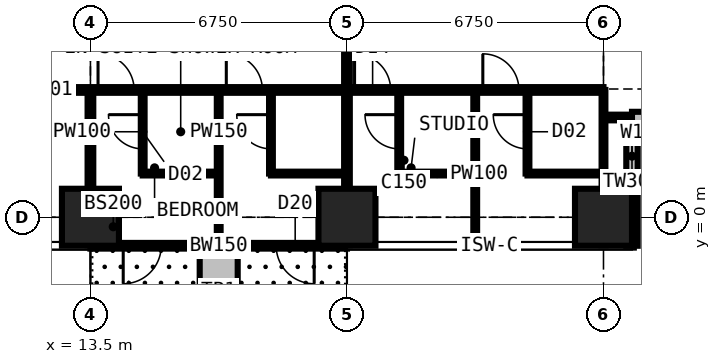
"""IFC4 building model, lengths in metres.
Left out: names, types, materials, properties, quantities, classifications, styles, units other than length and angle.
Written with IfcOpenShell. Run it as: python <this file> out.ifc"""

import sys

from ifc_helpers import new_model, si_unit, direction, frame, frame_2d, origin, origin_2d, place, context, subcontext, project, spatial, rectangle, extrude, element, fill, save


model = new_model("IFC4")
c1 = context("Model", 3, precision=1e-05, world=origin(), true_north=direction((0.0, 1.0)))
c2 = subcontext(c1, "Body", "Model", "MODEL_VIEW")
j1 = project(units=[si_unit("LENGTHUNIT", "METRE"), si_unit("PLANEANGLEUNIT", "RADIAN")], contexts=[c1])
p1 = place(None, origin())
s1 = spatial("IfcSite", under=j1, at=p1, CompositionType="ELEMENT")
p2 = place(p1, origin())
s2 = spatial("IfcBuilding", under=s1, at=p2, CompositionType="ELEMENT")
p3 = place(p2, frame((0.0, 0.0, 163.8)))
s3 = spatial("IfcBuildingStorey", under=s2, at=p3, CompositionType="ELEMENT", Elevation=163.8)
for number, where, z_axis, x_axis in (
    (1, (13.5, 0.0, 0.0), (0.0, 0.0, 1.0), (1.0, 0.0, 0.0)),
    (2, (20.25, 0.0, 0.0), (0.0, 0.0, 1.0), (1.0, 0.0, 0.0)),
    (3, (27.0, 0.0, 0.0), (0.0, 0.0, 1.0), (1.0, 0.0, 0.0)),
):
    element("IfcColumn", number, at=place(p3, frame(where, z_axis=z_axis, x_axis=x_axis)), inside=s3, PredefinedType="COLUMN", context=c2, shape_type="SweptSolid", body=[
        extrude(rectangle(XDim=1.5, YDim=1.5, at=origin_2d()), origin(), (0.0, 0.0, 1.0), 3.6),
    ])
p4 = place(p3, frame((20.25, -0.75, 0.0), z_axis=(0.0, 0.0, 1.0), x_axis=(-1.0, 0.0, 0.0)))
e4 = element("IfcWall", 4, at=p4, inside=s3, PredefinedType="SOLIDWALL", context=c2, shape_type="SweptSolid", body=[
    extrude(rectangle(XDim=6.75, YDim=0.15, at=frame_2d((3.375, 0.0))), origin(), (0.0, 0.0, 1.0), 3.375),
])
p5 = place(p4, frame((0.863, 0.0, 0.0)))
e5 = element("IfcOpeningElement", 5, at=p5, cuts=e4, PredefinedType="OPENING", context=c2, shape_type="SweptSolid", body=[
    extrude(rectangle(XDim=1.0, YDim=2.2, at=frame_2d((0.5, 1.1))), frame((0.0, 0.085, 0.0), z_axis=(0.0, -1.0, 0.0), x_axis=(1.0, 0.0, 0.0)), (0.0, 0.0, 1.0), 0.17),
])
p6 = place(p4, frame((1.975, 0.0, 0.9)))
e6 = element("IfcOpeningElement", 6, at=p6, cuts=e4, PredefinedType="OPENING", context=c2, shape_type="SweptSolid", body=[
    extrude(rectangle(XDim=1.2, YDim=1.8, at=frame_2d((0.6, 0.9))), frame((0.0, 0.085, 0.0), z_axis=(0.0, -1.0, 0.0), x_axis=(1.0, 0.0, 0.0)), (0.0, 0.0, 1.0), 0.17),
])
p7 = place(p4, frame((4.887, 0.0, 0.0)))
e7 = element("IfcOpeningElement", 7, at=p7, cuts=e4, PredefinedType="OPENING", context=c2, shape_type="SweptSolid", body=[
    extrude(rectangle(XDim=1.0, YDim=2.2, at=frame_2d((0.5, 1.1))), frame((0.0, 0.085, 0.0), z_axis=(0.0, -1.0, 0.0), x_axis=(1.0, 0.0, 0.0)), (0.0, 0.0, 1.0), 0.17),
])
p8 = place(p4, frame((3.575, 0.0, 0.9)))
e8 = element("IfcOpeningElement", 8, at=p8, cuts=e4, PredefinedType="OPENING", context=c2, shape_type="SweptSolid", body=[
    extrude(rectangle(XDim=1.2, YDim=1.8, at=frame_2d((0.6, 0.9))), frame((0.0, 0.085, 0.0), z_axis=(0.0, -1.0, 0.0), x_axis=(1.0, 0.0, 0.0)), (0.0, 0.0, 1.0), 0.17),
])
p9 = place(p3, frame((27.75, -0.75, 0.0), z_axis=(0.0, 0.0, 1.0), x_axis=(0.0, 1.0, 0.0)))
e9 = element("IfcWall", 9, at=p9, inside=s3, PredefinedType="SOLIDWALL", context=c2, shape_type="SweptSolid", body=[
    extrude(rectangle(XDim=3.375, YDim=0.3, at=frame_2d((1.688, 0.0))), origin(), (0.0, 0.0, 1.0), 3.375),
])
p10 = place(p9, frame((1.607, 0.0, 0.9)))
e10 = element("IfcOpeningElement", 10, at=p10, cuts=e9, PredefinedType="OPENING", context=c2, shape_type="SweptSolid", body=[
    extrude(rectangle(XDim=1.5, YDim=1.8, at=frame_2d((0.75, 0.9))), frame((0.0, 0.16, 0.0), z_axis=(0.0, -1.0, 0.0), x_axis=(1.0, 0.0, 0.0)), (0.0, 0.0, 1.0), 0.32),
])
p11 = place(p3, frame((27.75, 2.625, 0.0), z_axis=(0.0, 0.0, 1.0), x_axis=(1.0, 0.0, 0.0)))
e11 = element("IfcWall", 11, at=p11, inside=s3, PredefinedType="SOLIDWALL", context=c2, shape_type="SweptSolid", body=[
    extrude(rectangle(XDim=3.375, YDim=0.3, at=frame_2d((1.688, 0.0))), origin(), (0.0, 0.0, 1.0), 3.375),
])
p12 = place(p11, frame((0.788, 0.0, 0.6)))
e12 = element("IfcOpeningElement", 12, at=p12, cuts=e11, PredefinedType="OPENING", context=c2, shape_type="SweptSolid", body=[
    extrude(rectangle(XDim=1.8, YDim=2.1, at=frame_2d((0.9, 1.05))), frame((0.0, 0.16, 0.0), z_axis=(0.0, -1.0, 0.0), x_axis=(1.0, 0.0, 0.0)), (0.0, 0.0, 1.0), 0.32),
])
p13 = place(p3, frame((16.875, -0.85, 0.0), z_axis=(0.0, 0.0, 1.0), x_axis=(0.0, -1.0, 0.0)))
e13 = element("IfcWall", 13, at=p13, inside=s3, PredefinedType="USERDEFINED", context=c2, shape_type="SweptSolid", body=[
    extrude(rectangle(XDim=2.2, YDim=1.0, at=frame_2d((1.1, 0.0))), origin(), (0.0, 0.0, 1.0), 0.9),
])
p14 = place(p3, frame((6.75, 3.35, 0.0), z_axis=(0.0, 0.0, 1.0), x_axis=(1.0, 0.0, 0.0)))
e14 = element("IfcWall", 14, at=p14, inside=s3, PredefinedType="PARTITIONING", context=c2, shape_type="SweptSolid", body=[
    extrude(rectangle(XDim=20.25, YDim=0.15, at=frame_2d((10.125, 0.0))), origin(), (0.0, 0.0, 1.0), 3.375),
])
p15 = place(p14, frame((2.85, 0.0, 0.0)))
e15 = element("IfcOpeningElement", 15, at=p15, cuts=e14, PredefinedType="OPENING", context=c2, shape_type="SweptSolid", body=[
    extrude(rectangle(XDim=1.0, YDim=2.2, at=frame_2d((0.5, 1.1))), frame((0.0, 0.085, 0.0), z_axis=(0.0, -1.0, 0.0), x_axis=(1.0, 0.0, 0.0)), (0.0, 0.0, 1.0), 0.17),
])
p16 = place(p14, frame((6.95, 0.0, 0.0)))
e16 = element("IfcOpeningElement", 16, at=p16, cuts=e14, PredefinedType="OPENING", context=c2, shape_type="SweptSolid", body=[
    extrude(rectangle(XDim=0.95, YDim=2.2, at=frame_2d((0.475, 1.1))), frame((0.0, 0.085, 0.0), z_axis=(0.0, -1.0, 0.0), x_axis=(1.0, 0.0, 0.0)), (0.0, 0.0, 1.0), 0.17),
])
p17 = place(p14, frame((10.325, 0.0, 0.0)))
e17 = element("IfcOpeningElement", 17, at=p17, cuts=e14, PredefinedType="OPENING", context=c2, shape_type="SweptSolid", body=[
    extrude(rectangle(XDim=0.95, YDim=2.2, at=frame_2d((0.475, 1.1))), frame((0.0, 0.085, 0.0), z_axis=(0.0, -1.0, 0.0), x_axis=(1.0, 0.0, 0.0)), (0.0, 0.0, 1.0), 0.17),
])
p18 = place(p14, frame((13.7, 0.0, 0.0)))
e18 = element("IfcOpeningElement", 18, at=p18, cuts=e14, PredefinedType="OPENING", context=c2, shape_type="SweptSolid", body=[
    extrude(rectangle(XDim=0.95, YDim=2.2, at=frame_2d((0.475, 1.1))), frame((0.0, 0.085, 0.0), z_axis=(0.0, -1.0, 0.0), x_axis=(1.0, 0.0, 0.0)), (0.0, 0.0, 1.0), 0.17),
])
p19 = place(p14, frame((17.075, 0.0, 0.0)))
e19 = element("IfcOpeningElement", 19, at=p19, cuts=e14, PredefinedType="OPENING", context=c2, shape_type="SweptSolid", body=[
    extrude(rectangle(XDim=0.95, YDim=2.2, at=frame_2d((0.475, 1.1))), frame((0.0, 0.085, 0.0), z_axis=(0.0, -1.0, 0.0), x_axis=(1.0, 0.0, 0.0)), (0.0, 0.0, 1.0), 0.17),
])
p20 = place(p3, frame((13.5, -0.734, 0.0), z_axis=(0.0, 0.0, 1.0), x_axis=(0.0, 1.0, 0.0)))
e20 = element("IfcWall", 20, at=p20, inside=s3, PredefinedType="PARTITIONING", context=c2, shape_type="SweptSolid", body=[
    extrude(rectangle(XDim=4.084, YDim=0.15, at=frame_2d((2.042, 0.0))), origin(), (0.0, 0.0, 1.0), 2.877),
])
p21 = place(p3, frame((14.875, 1.15, 0.0), z_axis=(0.0, 0.0, 1.0), x_axis=(0.0, 1.0, 0.0)))
e21 = element("IfcWall", 21, at=p21, inside=s3, PredefinedType="PARTITIONING", context=c2, shape_type="SweptSolid", body=[
    extrude(rectangle(XDim=2.2, YDim=0.1, at=frame_2d((1.1, 0.0))), origin(), (0.0, 0.0, 1.0), 3.375),
])
p22 = place(p21, frame((0.65, 0.0, 0.0)))
e22 = element("IfcOpeningElement", 22, at=p22, cuts=e21, PredefinedType="OPENING", context=c2, shape_type="SweptSolid", body=[
    extrude(rectangle(XDim=0.9, YDim=2.2, at=frame_2d((0.45, 1.1))), frame((0.0, 0.06, 0.0), z_axis=(0.0, -1.0, 0.0), x_axis=(1.0, 0.0, 0.0)), (0.0, 0.0, 1.0), 0.12),
])
p23 = place(p3, frame((14.875, 1.15, 0.0), z_axis=(0.0, 0.0, 1.0), x_axis=(1.0, 0.0, 0.0)))
e23 = element("IfcWall", 23, at=p23, inside=s3, PredefinedType="PARTITIONING", context=c2, shape_type="SweptSolid", body=[
    extrude(rectangle(XDim=2.0, YDim=0.1, at=frame_2d((1.0, 0.0))), origin(), (0.0, 0.0, 1.0), 3.375),
])
p24 = place(p3, frame((16.875, -0.734, 0.0), z_axis=(0.0, 0.0, 1.0), x_axis=(0.0, 1.0, 0.0)))
e24 = element("IfcWall", 24, at=p24, inside=s3, PredefinedType="PARTITIONING", context=c2, shape_type="SweptSolid", body=[
    extrude(rectangle(XDim=4.084, YDim=0.1, at=frame_2d((2.042, 0.0))), origin(), (0.0, 0.0, 1.0), 3.375),
])
p25 = place(p3, frame((18.25, 1.15, 0.0), z_axis=(0.0, 0.0, 1.0), x_axis=(0.0, 1.0, 0.0)))
e25 = element("IfcWall", 25, at=p25, inside=s3, PredefinedType="PARTITIONING", context=c2, shape_type="SweptSolid", body=[
    extrude(rectangle(XDim=2.2, YDim=0.1, at=frame_2d((1.1, 0.0))), origin(), (0.0, 0.0, 1.0), 3.375),
])
p26 = place(p25, frame((0.65, 0.0, 0.0)))
e26 = element("IfcOpeningElement", 26, at=p26, cuts=e25, PredefinedType="OPENING", context=c2, shape_type="SweptSolid", body=[
    extrude(rectangle(XDim=0.9, YDim=2.2, at=frame_2d((0.45, 1.1))), frame((0.0, 0.06, 0.0), z_axis=(0.0, -1.0, 0.0), x_axis=(1.0, 0.0, 0.0)), (0.0, 0.0, 1.0), 0.12),
])
p27 = place(p3, frame((18.25, 1.15, 0.0), z_axis=(0.0, 0.0, 1.0), x_axis=(1.0, 0.0, 0.0)))
e27 = element("IfcWall", 27, at=p27, inside=s3, PredefinedType="PARTITIONING", context=c2, shape_type="SweptSolid", body=[
    extrude(rectangle(XDim=2.0, YDim=0.1, at=frame_2d((1.0, 0.0))), origin(), (0.0, 0.0, 1.0), 3.375),
])
p28 = place(p3, frame((20.25, -0.734, 0.0), z_axis=(0.0, 0.0, 1.0), x_axis=(0.0, 1.0, 0.0)))
e28 = element("IfcWall", 28, at=p28, inside=s3, PredefinedType="PARTITIONING", context=c2, shape_type="SweptSolid", body=[
    extrude(rectangle(XDim=12.034, YDim=0.15, at=frame_2d((6.017, 0.0))), origin(), (0.0, 0.0, 1.0), 2.806),
])
p29 = place(p3, frame((21.625, 1.15, 0.0), z_axis=(0.0, 0.0, 1.0), x_axis=(0.0, 1.0, 0.0)))
e29 = element("IfcWall", 29, at=p29, inside=s3, PredefinedType="PARTITIONING", context=c2, shape_type="SweptSolid", body=[
    extrude(rectangle(XDim=2.2, YDim=0.1, at=frame_2d((1.1, 0.0))), origin(), (0.0, 0.0, 1.0), 3.375),
])
p30 = place(p29, frame((0.65, 0.0, 0.0)))
e30 = element("IfcOpeningElement", 30, at=p30, cuts=e29, PredefinedType="OPENING", context=c2, shape_type="SweptSolid", body=[
    extrude(rectangle(XDim=0.9, YDim=2.2, at=frame_2d((0.45, 1.1))), frame((0.0, 0.06, 0.0), z_axis=(0.0, -1.0, 0.0), x_axis=(1.0, 0.0, 0.0)), (0.0, 0.0, 1.0), 0.12),
])
p31 = place(p3, frame((21.625, 1.15, 0.0), z_axis=(0.0, 0.0, 1.0), x_axis=(1.0, 0.0, 0.0)))
e31 = element("IfcWall", 31, at=p31, inside=s3, PredefinedType="PARTITIONING", context=c2, shape_type="SweptSolid", body=[
    extrude(rectangle(XDim=2.0, YDim=0.1, at=frame_2d((1.0, 0.0))), origin(), (0.0, 0.0, 1.0), 3.375),
])
p32 = place(p3, frame((23.625, -0.734, 0.0), z_axis=(0.0, 0.0, 1.0), x_axis=(0.0, 1.0, 0.0)))
e32 = element("IfcWall", 32, at=p32, inside=s3, PredefinedType="PARTITIONING", context=c2, shape_type="SweptSolid", body=[
    extrude(rectangle(XDim=4.084, YDim=0.1, at=frame_2d((2.042, 0.0))), origin(), (0.0, 0.0, 1.0), 3.375),
])
p33 = place(p3, frame((25.0, 1.15, 0.0), z_axis=(0.0, 0.0, 1.0), x_axis=(0.0, 1.0, 0.0)))
e33 = element("IfcWall", 33, at=p33, inside=s3, PredefinedType="PARTITIONING", context=c2, shape_type="SweptSolid", body=[
    extrude(rectangle(XDim=2.2, YDim=0.1, at=frame_2d((1.1, 0.0))), origin(), (0.0, 0.0, 1.0), 3.375),
])
p34 = place(p33, frame((0.65, 0.0, 0.0)))
e34 = element("IfcOpeningElement", 34, at=p34, cuts=e33, PredefinedType="OPENING", context=c2, shape_type="SweptSolid", body=[
    extrude(rectangle(XDim=0.9, YDim=2.2, at=frame_2d((0.45, 1.1))), frame((0.0, 0.06, 0.0), z_axis=(0.0, -1.0, 0.0), x_axis=(1.0, 0.0, 0.0)), (0.0, 0.0, 1.0), 0.12),
])
p35 = place(p3, frame((25.0, 1.15, 0.0), z_axis=(0.0, 0.0, 1.0), x_axis=(1.0, 0.0, 0.0)))
e35 = element("IfcWall", 35, at=p35, inside=s3, PredefinedType="PARTITIONING", context=c2, shape_type="SweptSolid", body=[
    extrude(rectangle(XDim=2.0, YDim=0.1, at=frame_2d((1.0, 0.0))), origin(), (0.0, 0.0, 1.0), 3.375),
])
p36 = place(p3, frame((27.0, -0.734, 0.0), z_axis=(0.0, 0.0, 1.0), x_axis=(0.0, 1.0, 0.0)))
e36 = element("IfcWall", 36, at=p36, inside=s3, PredefinedType="PARTITIONING", context=c2, shape_type="SweptSolid", body=[
    extrude(rectangle(XDim=4.084, YDim=0.1, at=frame_2d((2.042, 0.0))), origin(), (0.0, 0.0, 1.0), 2.877),
])
p37 = place(p3, frame((27.0, 2.625, 0.0), z_axis=(0.0, 0.0, 1.0), x_axis=(1.0, 0.0, 0.0)))
e37 = element("IfcWall", 37, at=p37, inside=s3, PredefinedType="PARTITIONING", context=c2, shape_type="SweptSolid", body=[
    extrude(rectangle(XDim=0.734, YDim=0.15, at=frame_2d((0.367, 0.0))), origin(), (0.0, 0.0, 1.0), 3.375),
])
p38 = place(p5, origin())
e38 = element("IfcDoor", 38, at=p38, inside=s3, OperationType="SINGLE_SWING_LEFT", PredefinedType="DOOR", context=c2, shape_type="SweptSolid", body=[
    extrude(rectangle(XDim=1.0, YDim=2.2, at=frame_2d((0.5, 1.1))), frame((0.0, 0.025, 0.0), z_axis=(0.0, -1.0, 0.0), x_axis=(1.0, 0.0, 0.0)), (0.0, 0.0, 1.0), 0.05),
])
fill(e5, e38)
p39 = place(p6, origin())
e39 = element("IfcWindow", 39, at=p39, inside=s3, PartitioningType="SINGLE_PANEL", PredefinedType="WINDOW", context=c2, shape_type="SweptSolid", body=[
    extrude(rectangle(XDim=1.2, YDim=1.8, at=frame_2d((0.6, 0.9))), frame((0.0, 0.03, 0.0), z_axis=(0.0, -1.0, 0.0), x_axis=(1.0, 0.0, 0.0)), (0.0, 0.0, 1.0), 0.06),
])
fill(e6, e39)
p40 = place(p7, origin())
e40 = element("IfcDoor", 40, at=p40, inside=s3, OperationType="SINGLE_SWING_RIGHT", PredefinedType="DOOR", context=c2, shape_type="SweptSolid", body=[
    extrude(rectangle(XDim=1.0, YDim=2.2, at=frame_2d((0.5, 1.1))), frame((0.0, 0.025, 0.0), z_axis=(0.0, -1.0, 0.0), x_axis=(1.0, 0.0, 0.0)), (0.0, 0.0, 1.0), 0.05),
])
fill(e7, e40)
p41 = place(p8, origin())
e41 = element("IfcWindow", 41, at=p41, inside=s3, PartitioningType="SINGLE_PANEL", PredefinedType="WINDOW", context=c2, shape_type="SweptSolid", body=[
    extrude(rectangle(XDim=1.2, YDim=1.8, at=frame_2d((0.6, 0.9))), frame((0.0, 0.03, 0.0), z_axis=(0.0, -1.0, 0.0), x_axis=(1.0, 0.0, 0.0)), (0.0, 0.0, 1.0), 0.06),
])
fill(e8, e41)
p42 = place(p10, origin())
e42 = element("IfcWindow", 42, at=p42, inside=s3, PartitioningType="SINGLE_PANEL", PredefinedType="WINDOW", context=c2, shape_type="SweptSolid", body=[
    extrude(rectangle(XDim=1.5, YDim=1.8, at=frame_2d((0.75, 0.9))), frame((0.0, 0.03, 0.0), z_axis=(0.0, -1.0, 0.0), x_axis=(1.0, 0.0, 0.0)), (0.0, 0.0, 1.0), 0.06),
])
fill(e10, e42)
p43 = place(p16, origin())
e43 = element("IfcDoor", 43, at=p43, inside=s3, OperationType="SINGLE_SWING_LEFT", PredefinedType="DOOR", context=c2, shape_type="SweptSolid", body=[
    extrude(rectangle(XDim=0.95, YDim=2.2, at=frame_2d((0.475, 1.1))), frame((0.0, 0.025, 0.0), z_axis=(0.0, -1.0, 0.0), x_axis=(1.0, 0.0, 0.0)), (0.0, 0.0, 1.0), 0.05),
])
fill(e16, e43)
p44 = place(p22, origin())
e44 = element("IfcDoor", 44, at=p44, inside=s3, OperationType="SINGLE_SWING_RIGHT", PredefinedType="DOOR", context=c2, shape_type="SweptSolid", body=[
    extrude(rectangle(XDim=0.9, YDim=2.2, at=frame_2d((0.45, 1.1))), frame((0.0, 0.025, 0.0), z_axis=(0.0, -1.0, 0.0), x_axis=(1.0, 0.0, 0.0)), (0.0, 0.0, 1.0), 0.05),
])
fill(e22, e44)
p45 = place(p17, origin())
e45 = element("IfcDoor", 45, at=p45, inside=s3, OperationType="SINGLE_SWING_LEFT", PredefinedType="DOOR", context=c2, shape_type="SweptSolid", body=[
    extrude(rectangle(XDim=0.95, YDim=2.2, at=frame_2d((0.475, 1.1))), frame((0.0, 0.025, 0.0), z_axis=(0.0, -1.0, 0.0), x_axis=(1.0, 0.0, 0.0)), (0.0, 0.0, 1.0), 0.05),
])
fill(e17, e45)
p46 = place(p26, origin())
e46 = element("IfcDoor", 46, at=p46, inside=s3, OperationType="SINGLE_SWING_RIGHT", PredefinedType="DOOR", context=c2, shape_type="SweptSolid", body=[
    extrude(rectangle(XDim=0.9, YDim=2.2, at=frame_2d((0.45, 1.1))), frame((0.0, 0.025, 0.0), z_axis=(0.0, -1.0, 0.0), x_axis=(1.0, 0.0, 0.0)), (0.0, 0.0, 1.0), 0.05),
])
fill(e26, e46)
p47 = place(p18, origin())
e47 = element("IfcDoor", 47, at=p47, inside=s3, OperationType="SINGLE_SWING_LEFT", PredefinedType="DOOR", context=c2, shape_type="SweptSolid", body=[
    extrude(rectangle(XDim=0.95, YDim=2.2, at=frame_2d((0.475, 1.1))), frame((0.0, 0.025, 0.0), z_axis=(0.0, -1.0, 0.0), x_axis=(1.0, 0.0, 0.0)), (0.0, 0.0, 1.0), 0.05),
])
fill(e18, e47)
p48 = place(p30, origin())
e48 = element("IfcDoor", 48, at=p48, inside=s3, OperationType="SINGLE_SWING_RIGHT", PredefinedType="DOOR", context=c2, shape_type="SweptSolid", body=[
    extrude(rectangle(XDim=0.9, YDim=2.2, at=frame_2d((0.45, 1.1))), frame((0.0, 0.025, 0.0), z_axis=(0.0, -1.0, 0.0), x_axis=(1.0, 0.0, 0.0)), (0.0, 0.0, 1.0), 0.05),
])
fill(e30, e48)
p49 = place(p19, origin())
e49 = element("IfcDoor", 49, at=p49, inside=s3, OperationType="SINGLE_SWING_LEFT", PredefinedType="DOOR", context=c2, shape_type="SweptSolid", body=[
    extrude(rectangle(XDim=0.95, YDim=2.2, at=frame_2d((0.475, 1.1))), frame((0.0, 0.025, 0.0), z_axis=(0.0, -1.0, 0.0), x_axis=(1.0, 0.0, 0.0)), (0.0, 0.0, 1.0), 0.05),
])
fill(e19, e49)
p50 = place(p34, origin())
e50 = element("IfcDoor", 50, at=p50, inside=s3, OperationType="SINGLE_SWING_RIGHT", PredefinedType="DOOR", context=c2, shape_type="SweptSolid", body=[
    extrude(rectangle(XDim=0.9, YDim=2.2, at=frame_2d((0.45, 1.1))), frame((0.0, 0.025, 0.0), z_axis=(0.0, -1.0, 0.0), x_axis=(1.0, 0.0, 0.0)), (0.0, 0.0, 1.0), 0.05),
])
fill(e34, e50)
save(model, sys.argv[1])
